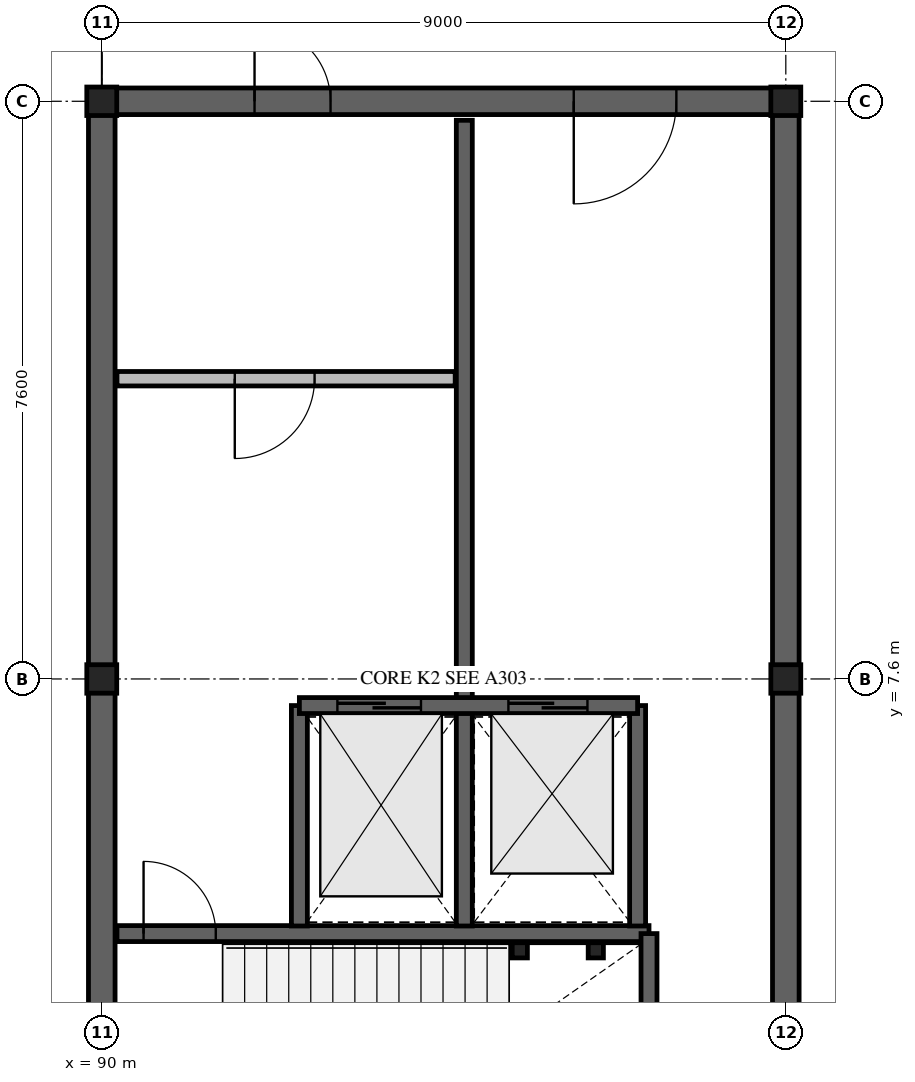
"""IFC4 building model, lengths in metres.
Left out: names, types, materials, properties, quantities, classifications, styles, units other than length and angle.
Written with IfcOpenShell. Run it as: python <this file> out.ifc"""

import sys

from ifc_helpers import new_model, si_unit, direction, frame, frame_2d, origin, origin_2d, place, context, subcontext, project, spatial, rectangle, hollow_rectangle, i_section, extrude, element, fill, save


model = new_model("IFC4")
c1 = context("Model", 3, precision=1e-05, world=origin(), true_north=direction((0.0, 1.0)))
c2 = subcontext(c1, "Body", "Model", "MODEL_VIEW")
j1 = project(units=[si_unit("LENGTHUNIT", "METRE"), si_unit("PLANEANGLEUNIT", "RADIAN")], contexts=[c1])
p1 = place(None, origin())
s1 = spatial("IfcSite", under=j1, at=p1, CompositionType="ELEMENT")
p2 = place(p1, origin())
s2 = spatial("IfcBuilding", under=s1, at=p2, CompositionType="ELEMENT")
p3 = place(p2, origin())
s3 = spatial("IfcBuildingStorey", under=s2, at=p3, CompositionType="ELEMENT", Elevation=0.0)
for number, where, z_axis, x_axis in (
    (1, (90.0, 7.6, 0.0), (0.0, 0.0, 1.0), (1.0, 0.0, 0.0)),
    (2, (90.0, 15.2, 0.0), (0.0, 0.0, 1.0), (1.0, 0.0, 0.0)),
    (3, (99.0, 7.6, 0.0), (0.0, 0.0, 1.0), (1.0, 0.0, 0.0)),
    (4, (99.0, 15.2, 0.0), (0.0, 0.0, 1.0), (1.0, 0.0, 0.0)),
):
    element("IfcColumn", number, at=place(p3, frame(where, z_axis=z_axis, x_axis=x_axis)), inside=s3, PredefinedType="COLUMN", context=c2, shape_type="SweptSolid", body=[
        extrude(i_section(OverallWidth=0.394, OverallDepth=0.375, WebThickness=0.017, FlangeThickness=0.028, FilletRadius=0.018, at=origin_2d()), origin(), (0.0, 0.0, 1.0), 5.04),
    ])
p4 = place(p3, frame((90.16, 15.2, 0.0), z_axis=(0.0, 0.0, 1.0), x_axis=(1.0, 0.0, 0.0)))
e5 = element("IfcWall", 5, at=p4, inside=s3, PredefinedType="SHEAR", context=c2, shape_type="SweptSolid", body=[
    extrude(rectangle(XDim=8.68, YDim=0.35, at=frame_2d((4.34, 0.0))), origin(), (0.0, 0.0, 1.0), 4.76),
])
p5 = place(p4, frame((1.85, 0.0, 0.0)))
e6 = element("IfcOpeningElement", 6, at=p5, cuts=e5, PredefinedType="OPENING", context=c2, shape_type="SweptSolid", body=[
    extrude(rectangle(XDim=1.0, YDim=2.15, at=frame_2d((0.5, 1.075))), frame((0.0, 0.185, 0.0), z_axis=(0.0, -1.0, 0.0), x_axis=(1.0, 0.0, 0.0)), (0.0, 0.0, 1.0), 0.37),
])
p6 = place(p4, frame((6.05, 0.0, 0.0)))
e7 = element("IfcOpeningElement", 7, at=p6, cuts=e5, PredefinedType="OPENING", context=c2, shape_type="SweptSolid", body=[
    extrude(rectangle(XDim=1.35, YDim=2.18, at=frame_2d((0.675, 1.09))), frame((0.0, 0.185, 0.0), z_axis=(0.0, -1.0, 0.0), x_axis=(1.0, 0.0, 0.0)), (0.0, 0.0, 1.0), 0.37),
])
for number, where, z_axis, x_axis in (
    (8, (90.0, 0.16, 0.0), (0.0, 0.0, 1.0), (0.0, 1.0, 0.0)),
    (9, (99.0, 0.16, 0.0), (0.0, 0.0, 1.0), (0.0, 1.0, 0.0)),
):
    element("IfcWall", number, at=place(p3, frame(where, z_axis=z_axis, x_axis=x_axis)), inside=s3, PredefinedType="SHEAR", context=c2, shape_type="SweptSolid", body=[
        extrude(rectangle(XDim=14.88, YDim=0.35, at=frame_2d((7.44, 0.0))), origin(), (0.0, 0.0, 1.0), 4.76),
    ])
p7 = place(p3, frame((90.2, 4.25, 0.0), z_axis=(0.0, 0.0, 1.0), x_axis=(1.0, 0.0, 0.0)))
e10 = element("IfcWall", 10, at=p7, inside=s3, PredefinedType="SOLIDWALL", context=c2, shape_type="SweptSolid", body=[
    extrude(rectangle(XDim=7.0, YDim=0.21, at=frame_2d((3.5, 0.0))), origin(), (0.0, 0.0, 1.0), 4.76),
])
p8 = place(p7, frame((0.35, 0.0, 0.0)))
e11 = element("IfcOpeningElement", 11, at=p8, cuts=e10, PredefinedType="OPENING", context=c2, shape_type="SweptSolid", body=[
    extrude(rectangle(XDim=0.95, YDim=2.12, at=frame_2d((0.475, 1.06))), frame((0.0, 0.115, 0.0), z_axis=(0.0, -1.0, 0.0), x_axis=(1.0, 0.0, 0.0)), (0.0, 0.0, 1.0), 0.23),
])
p9 = place(p3, frame((97.2, 0.2, 0.0), z_axis=(0.0, 0.0, 1.0), x_axis=(0.0, 1.0, 0.0)))
e12 = element("IfcWall", 12, at=p9, inside=s3, PredefinedType="SOLIDWALL", context=c2, shape_type="SweptSolid", body=[
    extrude(rectangle(XDim=4.05, YDim=0.21, at=frame_2d((2.025, 0.0))), origin(), (0.0, 0.0, 1.0), 4.76),
])
p10 = place(p3, frame((92.6, 4.35, 0.0), z_axis=(0.0, 0.0, 1.0), x_axis=(0.0, 1.0, 0.0)))
e13 = element("IfcWall", 13, at=p10, inside=s3, PredefinedType="SOLIDWALL", context=c2, shape_type="SweptSolid", body=[
    extrude(rectangle(XDim=2.9, YDim=0.21, at=frame_2d((1.45, 0.0))), origin(), (0.0, 0.0, 1.0), 4.76),
])
p11 = place(p3, frame((94.77, 4.35, 0.0), z_axis=(0.0, 0.0, 1.0), x_axis=(0.0, 1.0, 0.0)))
e14 = element("IfcWall", 14, at=p11, inside=s3, PredefinedType="SOLIDWALL", context=c2, shape_type="SweptSolid", body=[
    extrude(rectangle(XDim=10.6, YDim=0.21, at=frame_2d((5.3, 0.0))), origin(), (0.0, 0.0, 1.0), 4.76),
])
p12 = place(p3, frame((97.05, 4.35, 0.0), z_axis=(0.0, 0.0, 1.0), x_axis=(0.0, 1.0, 0.0)))
e15 = element("IfcWall", 15, at=p12, inside=s3, PredefinedType="SOLIDWALL", context=c2, shape_type="SweptSolid", body=[
    extrude(rectangle(XDim=2.9, YDim=0.21, at=frame_2d((1.45, 0.0))), origin(), (0.0, 0.0, 1.0), 4.76),
])
p13 = place(p3, frame((92.6, 7.25, 0.0), z_axis=(0.0, 0.0, 1.0), x_axis=(1.0, 0.0, 0.0)))
e16 = element("IfcWall", 16, at=p13, inside=s3, PredefinedType="SOLIDWALL", context=c2, shape_type="SweptSolid", body=[
    extrude(rectangle(XDim=4.45, YDim=0.21, at=frame_2d((2.225, 0.0))), origin(), (0.0, 0.0, 1.0), 4.76),
])
p14 = place(p13, frame((0.5, 0.0, 0.0)))
e17 = element("IfcOpeningElement", 17, at=p14, cuts=e16, PredefinedType="OPENING", context=c2, shape_type="SweptSolid", body=[
    extrude(rectangle(XDim=1.1, YDim=2.14, at=frame_2d((0.55, 1.07))), frame((0.0, 0.115, 0.0), z_axis=(0.0, -1.0, 0.0), x_axis=(1.0, 0.0, 0.0)), (0.0, 0.0, 1.0), 0.23),
])
p15 = place(p13, frame((2.75, 0.0, 0.0)))
e18 = element("IfcOpeningElement", 18, at=p15, cuts=e16, PredefinedType="OPENING", context=c2, shape_type="SweptSolid", body=[
    extrude(rectangle(XDim=1.04, YDim=2.1, at=frame_2d((0.52, 1.05))), frame((0.0, 0.115, 0.0), z_axis=(0.0, -1.0, 0.0), x_axis=(1.0, 0.0, 0.0)), (0.0, 0.0, 1.0), 0.23),
])
p16 = place(p3, frame((90.2, 11.55, 0.0), z_axis=(0.0, 0.0, 1.0), x_axis=(1.0, 0.0, 0.0)))
e19 = element("IfcWall", 19, at=p16, inside=s3, PredefinedType="SOLIDWALL", context=c2, shape_type="SweptSolid", body=[
    extrude(rectangle(XDim=4.45, YDim=0.19, at=frame_2d((2.225, 0.0))), origin(), (0.0, 0.0, 1.0), 4.76),
])
p17 = place(p16, frame((1.55, 0.0, 0.0)))
e20 = element("IfcOpeningElement", 20, at=p17, cuts=e19, PredefinedType="OPENING", context=c2, shape_type="SweptSolid", body=[
    extrude(rectangle(XDim=1.05, YDim=2.12, at=frame_2d((0.525, 1.06))), frame((0.0, 0.105, 0.0), z_axis=(0.0, -1.0, 0.0), x_axis=(1.0, 0.0, 0.0)), (0.0, 0.0, 1.0), 0.21),
])
for number, where, z_axis, x_axis in (
    (21, (95.5, 4.03, 0.0), (0.0, 0.0, 1.0), (1.0, 0.0, 0.0)),
    (22, (96.5, 4.03, 0.0), (0.0, 0.0, 1.0), (1.0, 0.0, 0.0)),
):
    element("IfcColumn", number, at=place(p3, frame(where, z_axis=z_axis, x_axis=x_axis)), inside=s3, PredefinedType="COLUMN", context=c2, shape_type="SweptSolid", body=[
        extrude(hollow_rectangle(XDim=0.2, YDim=0.2, WallThickness=0.012, at=origin_2d()), origin(), (0.0, 0.0, 1.0), 5.04),
    ])
p18 = place(p8, origin())
e23 = element("IfcDoor", 23, at=p18, inside=s3, OperationType="SINGLE_SWING_LEFT", PredefinedType="DOOR", context=c2, shape_type="SweptSolid", body=[
    extrude(rectangle(XDim=0.95, YDim=2.12, at=frame_2d((0.475, 1.06))), frame((0.0, 0.025, 0.0), z_axis=(0.0, -1.0, 0.0), x_axis=(1.0, 0.0, 0.0)), (0.0, 0.0, 1.0), 0.05),
])
fill(e11, e23)
p19 = place(p14, origin())
e24 = element("IfcDoor", 24, at=p19, inside=s3, OperationType="SLIDING_TO_LEFT", PredefinedType="DOOR", context=c2, shape_type="SweptSolid", body=[
    extrude(rectangle(XDim=1.1, YDim=2.14, at=frame_2d((0.55, 1.07))), frame((0.0, 0.025, 0.0), z_axis=(0.0, -1.0, 0.0), x_axis=(1.0, 0.0, 0.0)), (0.0, 0.0, 1.0), 0.05),
])
fill(e17, e24)
p20 = place(p15, origin())
e25 = element("IfcDoor", 25, at=p20, inside=s3, OperationType="SLIDING_TO_LEFT", PredefinedType="DOOR", context=c2, shape_type="SweptSolid", body=[
    extrude(rectangle(XDim=1.04, YDim=2.1, at=frame_2d((0.52, 1.05))), frame((0.0, 0.025, 0.0), z_axis=(0.0, -1.0, 0.0), x_axis=(1.0, 0.0, 0.0)), (0.0, 0.0, 1.0), 0.05),
])
fill(e18, e25)
p21 = place(p17, origin())
e26 = element("IfcDoor", 26, at=p21, inside=s3, OperationType="SINGLE_SWING_RIGHT", PredefinedType="DOOR", context=c2, shape_type="SweptSolid", body=[
    extrude(rectangle(XDim=1.05, YDim=2.12, at=frame_2d((0.525, 1.06))), frame((0.0, 0.025, 0.0), z_axis=(0.0, -1.0, 0.0), x_axis=(1.0, 0.0, 0.0)), (0.0, 0.0, 1.0), 0.05),
])
fill(e20, e26)
p22 = place(p5, origin())
e27 = element("IfcDoor", 27, at=p22, inside=s3, OperationType="SINGLE_SWING_LEFT", PredefinedType="DOOR", context=c2, shape_type="SweptSolid", body=[
    extrude(rectangle(XDim=1.0, YDim=2.15, at=frame_2d((0.5, 1.075))), frame((0.0, 0.025, 0.0), z_axis=(0.0, -1.0, 0.0), x_axis=(1.0, 0.0, 0.0)), (0.0, 0.0, 1.0), 0.05),
])
fill(e6, e27)
p23 = place(p6, origin())
e28 = element("IfcDoor", 28, at=p23, inside=s3, OperationType="SINGLE_SWING_RIGHT", PredefinedType="DOOR", context=c2, shape_type="SweptSolid", body=[
    extrude(rectangle(XDim=1.35, YDim=2.18, at=frame_2d((0.675, 1.09))), frame((0.0, 0.025, 0.0), z_axis=(0.0, -1.0, 0.0), x_axis=(1.0, 0.0, 0.0)), (0.0, 0.0, 1.0), 0.05),
])
fill(e7, e28)
save(model, sys.argv[1])
